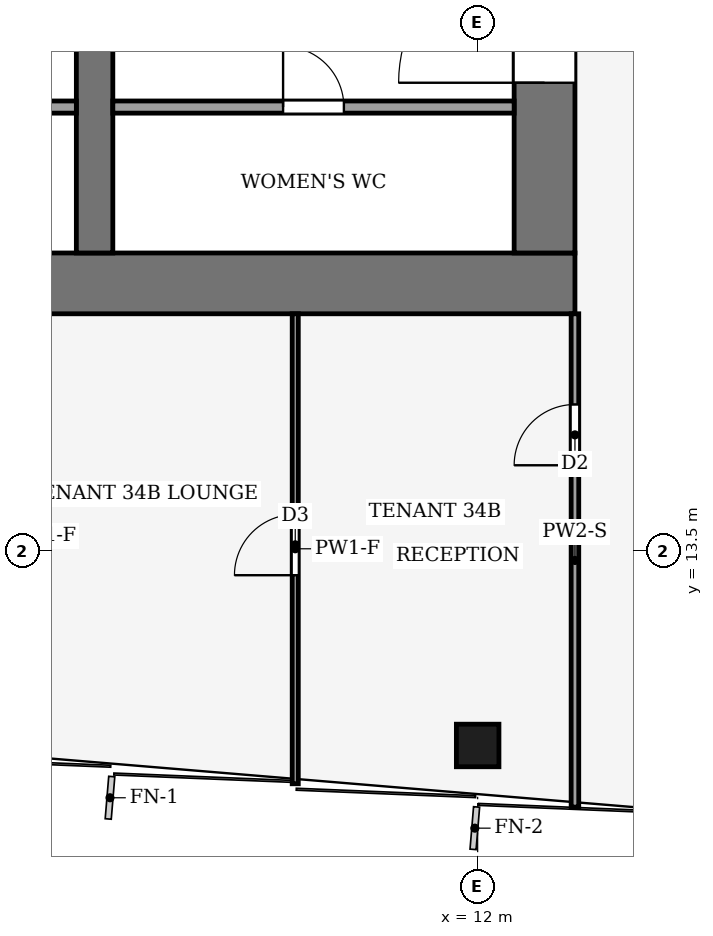
"""IFC4 building model, lengths in metres.
Left out: names, types, materials, properties, quantities, classifications, styles, units other than length and angle.
Written with IfcOpenShell. Run it as: python <this file> out.ifc"""

import sys

from ifc_helpers import new_model, si_unit, direction, frame, frame_2d, origin, origin_2d, place, context, subcontext, project, spatial, rectangle, hollow_rectangle, extrude, element, fill, save


model = new_model("IFC4")
c1 = context("Model", 3, precision=1e-05, world=origin(), true_north=direction((0.0, 1.0)))
c2 = subcontext(c1, "Body", "Model", "MODEL_VIEW")
j1 = project(units=[si_unit("LENGTHUNIT", "METRE"), si_unit("PLANEANGLEUNIT", "RADIAN")], contexts=[c1])
p1 = place(None, origin())
s1 = spatial("IfcSite", under=j1, at=p1, CompositionType="ELEMENT")
p2 = place(p1, origin())
s2 = spatial("IfcBuilding", under=s1, at=p2, CompositionType="ELEMENT")
p3 = place(p2, frame((0.0, 0.0, 150.0)))
s3 = spatial("IfcBuildingStorey", under=s2, at=p3, CompositionType="ELEMENT", Elevation=150.0)
p4 = place(p3, frame((-13.6, 17.9, -0.13), z_axis=(0.0, 0.0, 1.0), x_axis=(1.0, 0.0, 0.0)))
e1 = element("IfcWall", 1, at=p4, inside=s3, PredefinedType="SHEAR", context=c2, shape_type="SweptSolid", body=[
    extrude(rectangle(XDim=27.2, YDim=1.0, at=frame_2d((13.6, 0.0))), origin(), (0.0, 0.0, 1.0), 4.0),
])
p5 = place(p3, frame((13.1, 18.4, -0.13), z_axis=(0.0, 0.0, 1.0), x_axis=(0.0, 1.0, 0.0)))
e2 = element("IfcWall", 2, at=p5, inside=s3, PredefinedType="SHEAR", context=c2, shape_type="SweptSolid", body=[
    extrude(rectangle(XDim=19.2, YDim=1.0, at=frame_2d((9.6, 0.0))), origin(), (0.0, 0.0, 1.0), 4.0),
])
p6 = place(p5, frame((2.8, 0.0, 0.13)))
e3 = element("IfcOpeningElement", 3, at=p6, cuts=e2, PredefinedType="OPENING", context=c2, shape_type="SweptSolid", body=[
    extrude(rectangle(XDim=2.4, YDim=2.4, at=frame_2d((1.2, 1.2))), frame((0.0, 0.51, 0.0), z_axis=(0.0, -1.0, 0.0), x_axis=(1.0, 0.0, 0.0)), (0.0, 0.0, 1.0), 1.02),
])
p7 = place(p5, frame((13.3, 0.0, 0.13)))
e4 = element("IfcOpeningElement", 4, at=p7, cuts=e2, PredefinedType="OPENING", context=c2, shape_type="SweptSolid", body=[
    extrude(rectangle(XDim=2.4, YDim=2.4, at=frame_2d((1.2, 1.2))), frame((0.0, 0.51, 0.0), z_axis=(0.0, -1.0, 0.0), x_axis=(1.0, 0.0, 0.0)), (0.0, 0.0, 1.0), 1.02),
])
p8 = place(p3, frame((5.7, 18.4, -0.13), z_axis=(0.0, 0.0, 1.0), x_axis=(0.0, 1.0, 0.0)))
e5 = element("IfcWall", 5, at=p8, inside=s3, PredefinedType="SHEAR", context=c2, shape_type="SweptSolid", body=[
    extrude(rectangle(XDim=19.2, YDim=0.6, at=frame_2d((9.6, 0.0))), origin(), (0.0, 0.0, 1.0), 4.0),
])
p9 = place(p8, frame((8.35, 0.0, 0.13)))
e6 = element("IfcOpeningElement", 6, at=p9, cuts=e5, PredefinedType="OPENING", context=c2, shape_type="SweptSolid", body=[
    extrude(rectangle(XDim=0.9, YDim=2.1, at=frame_2d((0.45, 1.05))), frame((0.0, 0.31, 0.0), z_axis=(0.0, -1.0, 0.0), x_axis=(1.0, 0.0, 0.0)), (0.0, 0.0, 1.0), 0.62),
])
p10 = place(p8, frame((13.3, 0.0, 0.13)))
e7 = element("IfcOpeningElement", 7, at=p10, cuts=e5, PredefinedType="OPENING", context=c2, shape_type="SweptSolid", body=[
    extrude(rectangle(XDim=2.4, YDim=2.4, at=frame_2d((1.2, 1.2))), frame((0.0, 0.31, 0.0), z_axis=(0.0, -1.0, 0.0), x_axis=(1.0, 0.0, 0.0)), (0.0, 0.0, 1.0), 0.62),
])
p11 = place(p3, frame((12.0, 10.3, 0.0), z_axis=(0.0, 0.0, 1.0), x_axis=(1.0, 0.0, 0.0)))
e8 = element("IfcColumn", 8, at=p11, inside=s3, PredefinedType="COLUMN", context=c2, shape_type="SweptSolid", body=[
    extrude(hollow_rectangle(XDim=0.7, YDim=0.7, WallThickness=0.03, at=origin_2d()), origin(), (0.0, 0.0, 1.0), 4.0),
])
p12 = place(p3, frame((-5.4, 20.8, 0.0), z_axis=(0.0, 0.0, 1.0), x_axis=(1.0, 0.0, 0.0)))
e9 = element("IfcWall", 9, at=p12, inside=s3, PredefinedType="PARTITIONING", context=c2, shape_type="SweptSolid", body=[
    extrude(rectangle(XDim=10.8, YDim=0.2, at=frame_2d((5.4, 0.0))), origin(), (0.0, 0.0, 1.0), 3.87),
])
p13 = place(p12, frame((0.75, 0.0, 0.0)))
e10 = element("IfcOpeningElement", 10, at=p13, cuts=e9, PredefinedType="OPENING", context=c2, shape_type="SweptSolid", body=[
    extrude(rectangle(XDim=1.2, YDim=2.2, at=frame_2d((0.6, 1.1))), frame((0.0, 0.11, 0.0), z_axis=(0.0, -1.0, 0.0), x_axis=(1.0, 0.0, 0.0)), (0.0, 0.0, 1.0), 0.22),
])
p14 = place(p12, frame((3.45, 0.0, 0.0)))
e11 = element("IfcOpeningElement", 11, at=p14, cuts=e9, PredefinedType="OPENING", context=c2, shape_type="SweptSolid", body=[
    extrude(rectangle(XDim=1.2, YDim=2.2, at=frame_2d((0.6, 1.1))), frame((0.0, 0.11, 0.0), z_axis=(0.0, -1.0, 0.0), x_axis=(1.0, 0.0, 0.0)), (0.0, 0.0, 1.0), 0.22),
])
p15 = place(p12, frame((6.15, 0.0, 0.0)))
e12 = element("IfcOpeningElement", 12, at=p15, cuts=e9, PredefinedType="OPENING", context=c2, shape_type="SweptSolid", body=[
    extrude(rectangle(XDim=1.2, YDim=2.2, at=frame_2d((0.6, 1.1))), frame((0.0, 0.11, 0.0), z_axis=(0.0, -1.0, 0.0), x_axis=(1.0, 0.0, 0.0)), (0.0, 0.0, 1.0), 0.22),
])
p16 = place(p12, frame((8.85, 0.0, 0.0)))
e13 = element("IfcOpeningElement", 13, at=p16, cuts=e9, PredefinedType="OPENING", context=c2, shape_type="SweptSolid", body=[
    extrude(rectangle(XDim=1.2, YDim=2.2, at=frame_2d((0.6, 1.1))), frame((0.0, 0.11, 0.0), z_axis=(0.0, -1.0, 0.0), x_axis=(1.0, 0.0, 0.0)), (0.0, 0.0, 1.0), 0.22),
])
p17 = place(p3, frame((6.0, 20.8, 0.0), z_axis=(0.0, 0.0, 1.0), x_axis=(1.0, 0.0, 0.0)))
e14 = element("IfcWall", 14, at=p17, inside=s3, PredefinedType="PARTITIONING", context=c2, shape_type="SweptSolid", body=[
    extrude(rectangle(XDim=6.6, YDim=0.2, at=frame_2d((3.3, 0.0))), origin(), (0.0, 0.0, 1.0), 3.87),
])
p18 = place(p17, frame((2.8, 0.0, 0.0)))
e15 = element("IfcOpeningElement", 15, at=p18, cuts=e14, PredefinedType="OPENING", context=c2, shape_type="SweptSolid", body=[
    extrude(rectangle(XDim=1.0, YDim=2.1, at=frame_2d((0.5, 1.05))), frame((0.0, 0.11, 0.0), z_axis=(0.0, -1.0, 0.0), x_axis=(1.0, 0.0, 0.0)), (0.0, 0.0, 1.0), 0.22),
])
p19 = place(p3, frame((13.6, 9.287, 0.0), z_axis=(0.0, 0.0, 1.0), x_axis=(0.0, 1.0, 0.0)))
e16 = element("IfcWall", 16, at=p19, inside=s3, PredefinedType="PARTITIONING", context=c2, shape_type="SweptSolid", body=[
    extrude(rectangle(XDim=8.113, YDim=0.125, at=frame_2d((4.057, 0.0))), origin(), (0.0, 0.0, 1.0), 3.04),
])
p20 = place(p19, frame((5.622, 0.0, 0.0)))
e17 = element("IfcOpeningElement", 17, at=p20, cuts=e16, PredefinedType="OPENING", context=c2, shape_type="SweptSolid", body=[
    extrude(rectangle(XDim=1.0, YDim=2.1, at=frame_2d((0.5, 1.05))), frame((0.0, 0.073, 0.0), z_axis=(0.0, -1.0, 0.0), x_axis=(1.0, 0.0, 0.0)), (0.0, 0.0, 1.0), 0.145),
])
p21 = place(p3, frame((9.0, 9.67, 0.0), z_axis=(0.0, 0.0, 1.0), x_axis=(0.0, 1.0, 0.0)))
e18 = element("IfcWall", 18, at=p21, inside=s3, PredefinedType="PARTITIONING", context=c2, shape_type="SweptSolid", body=[
    extrude(rectangle(XDim=7.73, YDim=0.1, at=frame_2d((3.865, 0.0))), origin(), (0.0, 0.0, 1.0), 3.04),
])
p22 = place(p21, frame((3.43, 0.0, 0.0)))
e19 = element("IfcOpeningElement", 19, at=p22, cuts=e18, PredefinedType="OPENING", context=c2, shape_type="SweptSolid", body=[
    extrude(rectangle(XDim=1.0, YDim=2.1, at=frame_2d((0.5, 1.05))), frame((0.0, 0.06, 0.0), z_axis=(0.0, -1.0, 0.0), x_axis=(1.0, 0.0, 0.0)), (0.0, 0.0, 1.0), 0.12),
])
p23 = place(p18, origin())
e20 = element("IfcDoor", 20, at=p23, inside=s3, OperationType="SINGLE_SWING_LEFT", PredefinedType="DOOR", context=c2, shape_type="SweptSolid", body=[
    extrude(rectangle(XDim=1.0, YDim=2.1, at=frame_2d((0.5, 1.05))), frame((0.0, 0.025, 0.0), z_axis=(0.0, -1.0, 0.0), x_axis=(1.0, 0.0, 0.0)), (0.0, 0.0, 1.0), 0.05),
])
fill(e15, e20)
p24 = place(p6, origin())
e21 = element("IfcDoor", 21, at=p24, inside=s3, OperationType="DOUBLE_DOOR_SINGLE_SWING", PredefinedType="DOOR", context=c2, shape_type="SweptSolid", body=[
    extrude(rectangle(XDim=2.4, YDim=2.4, at=frame_2d((1.2, 1.2))), frame((0.0, 0.025, 0.0), z_axis=(0.0, -1.0, 0.0), x_axis=(1.0, 0.0, 0.0)), (0.0, 0.0, 1.0), 0.05),
])
fill(e3, e21)
p25 = place(p20, origin())
e22 = element("IfcDoor", 22, at=p25, inside=s3, OperationType="SINGLE_SWING_RIGHT", PredefinedType="DOOR", context=c2, shape_type="SweptSolid", body=[
    extrude(rectangle(XDim=1.0, YDim=2.1, at=frame_2d((0.5, 1.05))), frame((0.0, 0.025, 0.0), z_axis=(0.0, -1.0, 0.0), x_axis=(1.0, 0.0, 0.0)), (0.0, 0.0, 1.0), 0.05),
])
fill(e17, e22)
p26 = place(p22, origin())
e23 = element("IfcDoor", 23, at=p26, inside=s3, OperationType="SINGLE_SWING_RIGHT", PredefinedType="DOOR", context=c2, shape_type="SweptSolid", body=[
    extrude(rectangle(XDim=1.0, YDim=2.1, at=frame_2d((0.5, 1.05))), frame((0.0, 0.025, 0.0), z_axis=(0.0, -1.0, 0.0), x_axis=(1.0, 0.0, 0.0)), (0.0, 0.0, 1.0), 0.05),
])
fill(e19, e23)
save(model, sys.argv[1])
